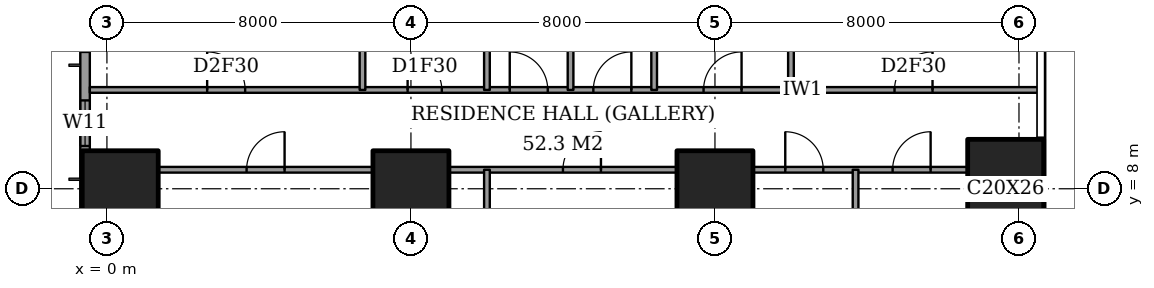
"""IFC4 building model, lengths in metres.
Left out: names, types, materials, properties, quantities, classifications, styles, units other than length and angle.
Written with IfcOpenShell. Run it as: python <this file> out.ifc"""

import sys

from ifc_helpers import new_model, si_unit, direction, frame, frame_2d, origin, origin_2d, place, context, subcontext, project, spatial, rectangle, extrude, element, fill, save


model = new_model("IFC4")
c1 = context("Model", 3, precision=1e-05, world=origin(), true_north=direction((0.0, 1.0)))
c2 = subcontext(c1, "Body", "Model", "MODEL_VIEW")
j1 = project(units=[si_unit("LENGTHUNIT", "METRE"), si_unit("PLANEANGLEUNIT", "RADIAN")], contexts=[c1])
p1 = place(None, origin())
s1 = spatial("IfcSite", under=j1, at=p1, CompositionType="ELEMENT")
p2 = place(p1, origin())
s2 = spatial("IfcBuilding", under=s1, at=p2, CompositionType="ELEMENT")
p3 = place(p2, frame((0.0, 0.0, 128.6)))
s3 = spatial("IfcBuildingStorey", under=s2, at=p3, CompositionType="ELEMENT", Elevation=128.6)
for number, where, z_axis, x_axis in (
    (1, (0.35, 8.0, 0.0), (0.0, 0.0, 1.0), (1.0, 0.0, 0.0)),
    (2, (8.0, 8.0, 0.0), (0.0, 0.0, 1.0), (1.0, 0.0, 0.0)),
    (3, (16.0, 8.0, 0.0), (0.0, 0.0, 1.0), (1.0, 0.0, 0.0)),
):
    element("IfcColumn", number, at=place(p3, frame(where, z_axis=z_axis, x_axis=x_axis)), inside=s3, PredefinedType="COLUMN", context=c2, shape_type="SweptSolid", body=[
        extrude(rectangle(XDim=2.0, YDim=2.0, at=origin_2d()), origin(), (0.0, 0.0, 1.0), 3.6),
    ])
p4 = place(p3, frame((23.65, 8.0, 0.0), z_axis=(0.0, 0.0, 1.0), x_axis=(1.0, 0.0, 0.0)))
e4 = element("IfcColumn", 4, at=p4, inside=s3, PredefinedType="COLUMN", context=c2, shape_type="SweptSolid", body=[
    extrude(rectangle(XDim=2.0, YDim=2.6, at=origin_2d()), origin(), (0.0, 0.0, 1.0), 3.6),
])
p5 = place(p3, frame((-0.575, 44.825, 0.0), z_axis=(0.0, 0.0, 1.0), x_axis=(0.0, -1.0, 0.0)))
e5 = element("IfcWall", 5, at=p5, inside=s3, PredefinedType="SOLIDWALL", context=c2, shape_type="SweptSolid", body=[
    extrude(rectangle(XDim=41.65, YDim=0.25, at=frame_2d((20.825, 0.0))), origin(), (0.0, 0.0, 1.0), 3.6),
])
p6 = place(p5, frame((0.775, 0.0, 0.4)))
e6 = element("IfcOpeningElement", 6, at=p6, cuts=e5, PredefinedType="OPENING", context=c2, shape_type="SweptSolid", body=[
    extrude(rectangle(XDim=2.4, YDim=2.2, at=frame_2d((1.2, 1.1))), frame((0.0, 0.135, 0.0), z_axis=(0.0, -1.0, 0.0), x_axis=(1.0, 0.0, 0.0)), (0.0, 0.0, 1.0), 0.27),
])
p7 = place(p5, frame((6.2, 0.0, 0.4)))
e7 = element("IfcOpeningElement", 7, at=p7, cuts=e5, PredefinedType="OPENING", context=c2, shape_type="SweptSolid", body=[
    extrude(rectangle(XDim=1.2, YDim=2.2, at=frame_2d((0.6, 1.1))), frame((0.0, 0.135, 0.0), z_axis=(0.0, -1.0, 0.0), x_axis=(1.0, 0.0, 0.0)), (0.0, 0.0, 1.0), 0.27),
])
p8 = place(p5, frame((8.525, 0.0, 0.4)))
e8 = element("IfcOpeningElement", 8, at=p8, cuts=e5, PredefinedType="OPENING", context=c2, shape_type="SweptSolid", body=[
    extrude(rectangle(XDim=2.4, YDim=2.2, at=frame_2d((1.2, 1.1))), frame((0.0, 0.135, 0.0), z_axis=(0.0, -1.0, 0.0), x_axis=(1.0, 0.0, 0.0)), (0.0, 0.0, 1.0), 0.27),
])
p9 = place(p5, frame((15.625, 0.0, 0.4)))
e9 = element("IfcOpeningElement", 9, at=p9, cuts=e5, PredefinedType="OPENING", context=c2, shape_type="SweptSolid", body=[
    extrude(rectangle(XDim=2.4, YDim=2.2, at=frame_2d((1.2, 1.1))), frame((0.0, 0.135, 0.0), z_axis=(0.0, -1.0, 0.0), x_axis=(1.0, 0.0, 0.0)), (0.0, 0.0, 1.0), 0.27),
])
p10 = place(p5, frame((23.625, 0.0, 0.4)))
e10 = element("IfcOpeningElement", 10, at=p10, cuts=e5, PredefinedType="OPENING", context=c2, shape_type="SweptSolid", body=[
    extrude(rectangle(XDim=2.4, YDim=2.2, at=frame_2d((1.2, 1.1))), frame((0.0, 0.135, 0.0), z_axis=(0.0, -1.0, 0.0), x_axis=(1.0, 0.0, 0.0)), (0.0, 0.0, 1.0), 0.27),
])
p11 = place(p5, frame((30.825, 0.0, 0.4)))
e11 = element("IfcOpeningElement", 11, at=p11, cuts=e5, PredefinedType="OPENING", context=c2, shape_type="SweptSolid", body=[
    extrude(rectangle(XDim=2.4, YDim=2.2, at=frame_2d((1.2, 1.1))), frame((0.0, 0.135, 0.0), z_axis=(0.0, -1.0, 0.0), x_axis=(1.0, 0.0, 0.0)), (0.0, 0.0, 1.0), 0.27),
])
p12 = place(p5, frame((34.5, 0.0, 0.4)))
e12 = element("IfcOpeningElement", 12, at=p12, cuts=e5, PredefinedType="OPENING", context=c2, shape_type="SweptSolid", body=[
    extrude(rectangle(XDim=1.2, YDim=2.2, at=frame_2d((0.6, 1.1))), frame((0.0, 0.135, 0.0), z_axis=(0.0, -1.0, 0.0), x_axis=(1.0, 0.0, 0.0)), (0.0, 0.0, 1.0), 0.27),
])
p13 = place(p5, frame((38.475, 0.0, 0.4)))
e13 = element("IfcOpeningElement", 13, at=p13, cuts=e5, PredefinedType="OPENING", context=c2, shape_type="SweptSolid", body=[
    extrude(rectangle(XDim=2.4, YDim=2.2, at=frame_2d((1.2, 1.1))), frame((0.0, 0.135, 0.0), z_axis=(0.0, -1.0, 0.0), x_axis=(1.0, 0.0, 0.0)), (0.0, 0.0, 1.0), 0.27),
])
p14 = place(p3, frame((1.35, 8.5, 0.0), z_axis=(0.0, 0.0, 1.0), x_axis=(1.0, 0.0, 0.0)))
e14 = element("IfcWall", 14, at=p14, inside=s3, PredefinedType="PARTITIONING", context=c2, shape_type="SweptSolid", body=[
    extrude(rectangle(XDim=5.65, YDim=0.15, at=frame_2d((2.825, 0.0))), origin(), (0.0, 0.0, 1.0), 3.35),
])
p15 = place(p14, frame((2.325, 0.0, 0.0)))
e15 = element("IfcOpeningElement", 15, at=p15, cuts=e14, PredefinedType="OPENING", context=c2, shape_type="SweptSolid", body=[
    extrude(rectangle(XDim=1.0, YDim=2.1, at=frame_2d((0.5, 1.05))), frame((0.0, 0.085, 0.0), z_axis=(0.0, -1.0, 0.0), x_axis=(1.0, 0.0, 0.0)), (0.0, 0.0, 1.0), 0.17),
])
p16 = place(p3, frame((9.0, 8.5, 0.0), z_axis=(0.0, 0.0, 1.0), x_axis=(1.0, 0.0, 0.0)))
e16 = element("IfcWall", 16, at=p16, inside=s3, PredefinedType="PARTITIONING", context=c2, shape_type="SweptSolid", body=[
    extrude(rectangle(XDim=6.0, YDim=0.15, at=frame_2d((3.0, 0.0))), origin(), (0.0, 0.0, 1.0), 3.35),
])
p17 = place(p16, frame((3.0, 0.0, 0.0)))
e17 = element("IfcOpeningElement", 17, at=p17, cuts=e16, PredefinedType="OPENING", context=c2, shape_type="SweptSolid", body=[
    extrude(rectangle(XDim=1.0, YDim=2.1, at=frame_2d((0.5, 1.05))), frame((0.0, 0.085, 0.0), z_axis=(0.0, -1.0, 0.0), x_axis=(1.0, 0.0, 0.0)), (0.0, 0.0, 1.0), 0.17),
])
p18 = place(p3, frame((17.0, 8.5, 0.0), z_axis=(0.0, 0.0, 1.0), x_axis=(1.0, 0.0, 0.0)))
e18 = element("IfcWall", 18, at=p18, inside=s3, PredefinedType="PARTITIONING", context=c2, shape_type="SweptSolid", body=[
    extrude(rectangle(XDim=5.65, YDim=0.15, at=frame_2d((2.825, 0.0))), origin(), (0.0, 0.0, 1.0), 3.35),
])
p19 = place(p18, frame((0.85, 0.0, 0.0)))
e19 = element("IfcOpeningElement", 19, at=p19, cuts=e18, PredefinedType="OPENING", context=c2, shape_type="SweptSolid", body=[
    extrude(rectangle(XDim=1.0, YDim=2.1, at=frame_2d((0.5, 1.05))), frame((0.0, 0.085, 0.0), z_axis=(0.0, -1.0, 0.0), x_axis=(1.0, 0.0, 0.0)), (0.0, 0.0, 1.0), 0.17),
])
p20 = place(p18, frame((3.675, 0.0, 0.0)))
e20 = element("IfcOpeningElement", 20, at=p20, cuts=e18, PredefinedType="OPENING", context=c2, shape_type="SweptSolid", body=[
    extrude(rectangle(XDim=1.0, YDim=2.1, at=frame_2d((0.5, 1.05))), frame((0.0, 0.085, 0.0), z_axis=(0.0, -1.0, 0.0), x_axis=(1.0, 0.0, 0.0)), (0.0, 0.0, 1.0), 0.17),
])
p21 = place(p3, frame((-0.45, 10.6, 0.0), z_axis=(0.0, 0.0, 1.0), x_axis=(1.0, 0.0, 0.0)))
e21 = element("IfcWall", 21, at=p21, inside=s3, PredefinedType="PARTITIONING", context=c2, shape_type="SweptSolid", body=[
    extrude(rectangle(XDim=25.011, YDim=0.15, at=frame_2d((12.505, 0.0))), origin(), (0.0, 0.0, 1.0), 3.35),
])
p22 = place(p21, frame((13.25, 0.0, 0.0)))
e22 = element("IfcOpeningElement", 22, at=p22, cuts=e21, PredefinedType="OPENING", context=c2, shape_type="SweptSolid", body=[
    extrude(rectangle(XDim=1.0, YDim=2.1, at=frame_2d((0.5, 1.05))), frame((0.0, 0.085, 0.0), z_axis=(0.0, -1.0, 0.0), x_axis=(1.0, 0.0, 0.0)), (0.0, 0.0, 1.0), 0.17),
])
p23 = place(p21, frame((3.087, 0.0, 0.0)))
e23 = element("IfcOpeningElement", 23, at=p23, cuts=e21, PredefinedType="OPENING", context=c2, shape_type="SweptSolid", body=[
    extrude(rectangle(XDim=1.0, YDim=2.1, at=frame_2d((0.5, 1.05))), frame((0.0, 0.085, 0.0), z_axis=(0.0, -1.0, 0.0), x_axis=(1.0, 0.0, 0.0)), (0.0, 0.0, 1.0), 0.17),
])
p24 = place(p21, frame((8.363, 0.0, 0.0)))
e24 = element("IfcOpeningElement", 24, at=p24, cuts=e21, PredefinedType="OPENING", context=c2, shape_type="SweptSolid", body=[
    extrude(rectangle(XDim=0.9, YDim=2.1, at=frame_2d((0.45, 1.05))), frame((0.0, 0.085, 0.0), z_axis=(0.0, -1.0, 0.0), x_axis=(1.0, 0.0, 0.0)), (0.0, 0.0, 1.0), 0.17),
])
p25 = place(p21, frame((11.05, 0.0, 0.0)))
e25 = element("IfcOpeningElement", 25, at=p25, cuts=e21, PredefinedType="OPENING", context=c2, shape_type="SweptSolid", body=[
    extrude(rectangle(XDim=1.0, YDim=2.1, at=frame_2d((0.5, 1.05))), frame((0.0, 0.085, 0.0), z_axis=(0.0, -1.0, 0.0), x_axis=(1.0, 0.0, 0.0)), (0.0, 0.0, 1.0), 0.17),
])
p26 = place(p21, frame((16.15, 0.0, 0.0)))
e26 = element("IfcOpeningElement", 26, at=p26, cuts=e21, PredefinedType="OPENING", context=c2, shape_type="SweptSolid", body=[
    extrude(rectangle(XDim=1.0, YDim=2.1, at=frame_2d((0.5, 1.05))), frame((0.0, 0.085, 0.0), z_axis=(0.0, -1.0, 0.0), x_axis=(1.0, 0.0, 0.0)), (0.0, 0.0, 1.0), 0.17),
])
p27 = place(p21, frame((21.175, 0.0, 0.0)))
e27 = element("IfcOpeningElement", 27, at=p27, cuts=e21, PredefinedType="OPENING", context=c2, shape_type="SweptSolid", body=[
    extrude(rectangle(XDim=1.0, YDim=2.1, at=frame_2d((0.5, 1.05))), frame((0.0, 0.085, 0.0), z_axis=(0.0, -1.0, 0.0), x_axis=(1.0, 0.0, 0.0)), (0.0, 0.0, 1.0), 0.17),
])
p28 = place(p3, frame((6.725, 10.6, 0.0), z_axis=(0.0, 0.0, 1.0), x_axis=(0.0, 1.0, 0.0)))
e28 = element("IfcWall", 28, at=p28, inside=s3, PredefinedType="PARTITIONING", context=c2, shape_type="SweptSolid", body=[
    extrude(rectangle(XDim=4.2, YDim=0.15, at=frame_2d((2.1, 0.0))), origin(), (0.0, 0.0, 1.0), 3.35),
])
p29 = place(p3, frame((10.0, -0.45, 0.0), z_axis=(0.0, 0.0, 1.0), x_axis=(0.0, 1.0, 0.0)))
e29 = element("IfcWall", 29, at=p29, inside=s3, PredefinedType="PARTITIONING", context=c2, shape_type="SweptSolid", body=[
    extrude(rectangle(XDim=8.95, YDim=0.15, at=frame_2d((4.475, 0.0))), origin(), (0.0, 0.0, 1.0), 3.35),
])
p30 = place(p3, frame((10.0, 10.6, 0.0), z_axis=(0.0, 0.0, 1.0), x_axis=(0.0, 1.0, 0.0)))
e30 = element("IfcWall", 30, at=p30, inside=s3, PredefinedType="PARTITIONING", context=c2, shape_type="SweptSolid", body=[
    extrude(rectangle(XDim=11.0, YDim=0.15, at=frame_2d((5.5, 0.0))), origin(), (0.0, 0.0, 1.0), 3.35),
])
p31 = place(p30, frame((8.2, 0.0, 0.0)))
e31 = element("IfcOpeningElement", 31, at=p31, cuts=e30, PredefinedType="OPENING", context=c2, shape_type="SweptSolid", body=[
    extrude(rectangle(XDim=1.0, YDim=2.1, at=frame_2d((0.5, 1.05))), frame((0.0, 0.085, 0.0), z_axis=(0.0, -1.0, 0.0), x_axis=(1.0, 0.0, 0.0)), (0.0, 0.0, 1.0), 0.17),
])
for number, where, z_axis, x_axis in (
    (32, (12.2, 10.6, 0.0), (0.0, 0.0, 1.0), (0.0, 1.0, 0.0)),
    (33, (14.4, 10.6, 0.0), (0.0, 0.0, 1.0), (0.0, 1.0, 0.0)),
    (34, (18.0, 10.6, 0.0), (0.0, 0.0, 1.0), (0.0, 1.0, 0.0)),
):
    element("IfcWall", number, at=place(p3, frame(where, z_axis=z_axis, x_axis=x_axis)), inside=s3, PredefinedType="PARTITIONING", context=c2, shape_type="SweptSolid", body=[
        extrude(rectangle(XDim=6.4, YDim=0.15, at=frame_2d((3.2, 0.0))), origin(), (0.0, 0.0, 1.0), 3.35),
    ])
p32 = place(p3, frame((19.7, -0.45, 0.0), z_axis=(0.0, 0.0, 1.0), x_axis=(0.0, 1.0, 0.0)))
e35 = element("IfcWall", 35, at=p32, inside=s3, PredefinedType="PARTITIONING", context=c2, shape_type="SweptSolid", body=[
    extrude(rectangle(XDim=8.95, YDim=0.15, at=frame_2d((4.475, 0.0))), origin(), (0.0, 0.0, 1.0), 3.35),
])
p33 = place(p12, origin())
e36 = element("IfcWindow", 36, at=p33, inside=s3, PartitioningType="SINGLE_PANEL", PredefinedType="WINDOW", context=c2, shape_type="SweptSolid", body=[
    extrude(rectangle(XDim=1.2, YDim=2.2, at=frame_2d((0.6, 1.1))), frame((0.0, 0.03, 0.0), z_axis=(0.0, -1.0, 0.0), x_axis=(1.0, 0.0, 0.0)), (0.0, 0.0, 1.0), 0.06),
])
fill(e12, e36)
p34 = place(p15, origin())
e37 = element("IfcDoor", 37, at=p34, inside=s3, OperationType="SINGLE_SWING_LEFT", PredefinedType="DOOR", context=c2, shape_type="SweptSolid", body=[
    extrude(rectangle(XDim=1.0, YDim=2.1, at=frame_2d((0.5, 1.05))), frame((0.0, 0.025, 0.0), z_axis=(0.0, -1.0, 0.0), x_axis=(1.0, 0.0, 0.0)), (0.0, 0.0, 1.0), 0.05),
])
fill(e15, e37)
p35 = place(p17, origin())
e38 = element("IfcDoor", 38, at=p35, inside=s3, OperationType="SINGLE_SWING_LEFT", PredefinedType="DOOR", context=c2, shape_type="SweptSolid", body=[
    extrude(rectangle(XDim=1.0, YDim=2.1, at=frame_2d((0.5, 1.05))), frame((0.0, 0.025, 0.0), z_axis=(0.0, -1.0, 0.0), x_axis=(1.0, 0.0, 0.0)), (0.0, 0.0, 1.0), 0.05),
])
fill(e17, e38)
p36 = place(p19, origin())
e39 = element("IfcDoor", 39, at=p36, inside=s3, OperationType="SINGLE_SWING_RIGHT", PredefinedType="DOOR", context=c2, shape_type="SweptSolid", body=[
    extrude(rectangle(XDim=1.0, YDim=2.1, at=frame_2d((0.5, 1.05))), frame((0.0, 0.025, 0.0), z_axis=(0.0, -1.0, 0.0), x_axis=(1.0, 0.0, 0.0)), (0.0, 0.0, 1.0), 0.05),
])
fill(e19, e39)
p37 = place(p20, origin())
e40 = element("IfcDoor", 40, at=p37, inside=s3, OperationType="SINGLE_SWING_LEFT", PredefinedType="DOOR", context=c2, shape_type="SweptSolid", body=[
    extrude(rectangle(XDim=1.0, YDim=2.1, at=frame_2d((0.5, 1.05))), frame((0.0, 0.025, 0.0), z_axis=(0.0, -1.0, 0.0), x_axis=(1.0, 0.0, 0.0)), (0.0, 0.0, 1.0), 0.05),
])
fill(e20, e40)
p38 = place(p22, origin())
e41 = element("IfcDoor", 41, at=p38, inside=s3, OperationType="SINGLE_SWING_LEFT", PredefinedType="DOOR", context=c2, shape_type="SweptSolid", body=[
    extrude(rectangle(XDim=1.0, YDim=2.1, at=frame_2d((0.5, 1.05))), frame((0.0, 0.025, 0.0), z_axis=(0.0, -1.0, 0.0), x_axis=(1.0, 0.0, 0.0)), (0.0, 0.0, 1.0), 0.05),
])
fill(e22, e41)
p39 = place(p23, origin())
e42 = element("IfcDoor", 42, at=p39, inside=s3, OperationType="SINGLE_SWING_RIGHT", PredefinedType="DOOR", context=c2, shape_type="SweptSolid", body=[
    extrude(rectangle(XDim=1.0, YDim=2.1, at=frame_2d((0.5, 1.05))), frame((0.0, 0.025, 0.0), z_axis=(0.0, -1.0, 0.0), x_axis=(1.0, 0.0, 0.0)), (0.0, 0.0, 1.0), 0.05),
])
fill(e23, e42)
p40 = place(p24, origin())
e43 = element("IfcDoor", 43, at=p40, inside=s3, OperationType="SINGLE_SWING_RIGHT", PredefinedType="DOOR", context=c2, shape_type="SweptSolid", body=[
    extrude(rectangle(XDim=0.9, YDim=2.1, at=frame_2d((0.45, 1.05))), frame((0.0, 0.025, 0.0), z_axis=(0.0, -1.0, 0.0), x_axis=(1.0, 0.0, 0.0)), (0.0, 0.0, 1.0), 0.05),
])
fill(e24, e43)
p41 = place(p25, origin())
e44 = element("IfcDoor", 44, at=p41, inside=s3, OperationType="SINGLE_SWING_RIGHT", PredefinedType="DOOR", context=c2, shape_type="SweptSolid", body=[
    extrude(rectangle(XDim=1.0, YDim=2.1, at=frame_2d((0.5, 1.05))), frame((0.0, 0.025, 0.0), z_axis=(0.0, -1.0, 0.0), x_axis=(1.0, 0.0, 0.0)), (0.0, 0.0, 1.0), 0.05),
])
fill(e25, e44)
p42 = place(p26, origin())
e45 = element("IfcDoor", 45, at=p42, inside=s3, OperationType="SINGLE_SWING_LEFT", PredefinedType="DOOR", context=c2, shape_type="SweptSolid", body=[
    extrude(rectangle(XDim=1.0, YDim=2.1, at=frame_2d((0.5, 1.05))), frame((0.0, 0.025, 0.0), z_axis=(0.0, -1.0, 0.0), x_axis=(1.0, 0.0, 0.0)), (0.0, 0.0, 1.0), 0.05),
])
fill(e26, e45)
p43 = place(p27, origin())
e46 = element("IfcDoor", 46, at=p43, inside=s3, OperationType="SINGLE_SWING_LEFT", PredefinedType="DOOR", context=c2, shape_type="SweptSolid", body=[
    extrude(rectangle(XDim=1.0, YDim=2.1, at=frame_2d((0.5, 1.05))), frame((0.0, 0.025, 0.0), z_axis=(0.0, -1.0, 0.0), x_axis=(1.0, 0.0, 0.0)), (0.0, 0.0, 1.0), 0.05),
])
fill(e27, e46)
save(model, sys.argv[1])
